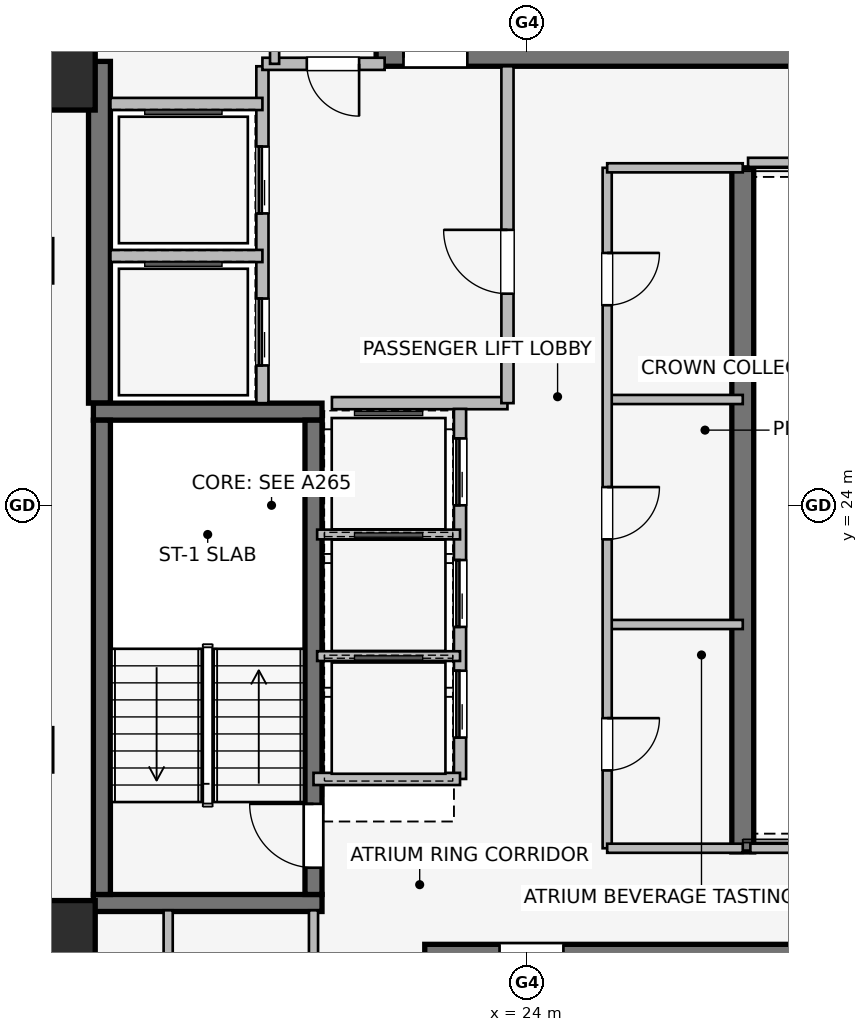
"""IFC4 building model, lengths in metres.
Left out: names, types, materials, properties, quantities, classifications, styles, units other than length and angle.
Written with IfcOpenShell. Run it as: python <this file> out.ifc"""

import sys

from ifc_helpers import new_model, si_unit, direction, frame, frame_2d, origin, origin_2d, place, context, subcontext, project, spatial, rectangle, extrude, element, fill, save


model = new_model("IFC4")
c1 = context("Model", 3, precision=1e-05, world=origin(), true_north=direction((0.0, 1.0)))
c2 = subcontext(c1, "Body", "Model", "MODEL_VIEW")
j1 = project(units=[si_unit("LENGTHUNIT", "METRE"), si_unit("PLANEANGLEUNIT", "RADIAN")], contexts=[c1])
p1 = place(None, origin())
s1 = spatial("IfcSite", under=j1, at=p1, CompositionType="ELEMENT")
p2 = place(p1, origin())
s2 = spatial("IfcBuilding", under=s1, at=p2, CompositionType="ELEMENT")
p3 = place(p2, frame((0.0, 0.0, 231.25)))
s3 = spatial("IfcBuildingStorey", under=s2, at=p3, CompositionType="ELEMENT", Elevation=231.25)
p4 = place(p3, frame((16.97, 25.68, 0.0), z_axis=(0.0, 0.0, 1.0), x_axis=(0.0, 1.0, 0.0)))
e1 = element("IfcWall", 1, at=p4, inside=s3, PredefinedType="SHEAR", context=c2, shape_type="SweptSolid", body=[
    extrude(rectangle(XDim=5.62, YDim=0.36, at=frame_2d((2.81, 0.0))), origin(), (0.0, 0.0, 1.0), 3.55),
])
p5 = place(p3, frame((27.55, 29.55, 0.0), z_axis=(0.0, 0.0, 1.0), x_axis=(0.0, -1.0, 0.0)))
e2 = element("IfcWall", 2, at=p5, inside=s3, PredefinedType="SHEAR", context=c2, shape_type="SweptSolid", body=[
    extrude(rectangle(XDim=11.25, YDim=0.36, at=frame_2d((5.625, 0.0))), origin(), (0.0, 0.0, 1.0), 3.55),
])
for number, where, z_axis, x_axis in (
    (3, (16.87, 17.46, 0.0), (0.0, 0.0, 1.0), (1.0, 0.0, 0.0)),
    (4, (20.63, 25.54, 0.0), (0.0, 0.0, 1.0), (-1.0, 0.0, 0.0)),
):
    element("IfcWall", number, at=place(p3, frame(where, z_axis=z_axis, x_axis=x_axis)), inside=s3, PredefinedType="SHEAR", context=c2, shape_type="SweptSolid", body=[
        extrude(rectangle(XDim=3.76, YDim=0.28, at=frame_2d((1.88, 0.0))), origin(), (0.0, 0.0, 1.0), 3.55),
    ])
p6 = place(p3, frame((17.01, 25.4, 0.0), z_axis=(0.0, 0.0, 1.0), x_axis=(0.0, -1.0, 0.0)))
e5 = element("IfcWall", 5, at=p6, inside=s3, PredefinedType="SHEAR", context=c2, shape_type="SweptSolid", body=[
    extrude(rectangle(XDim=7.8, YDim=0.28, at=frame_2d((3.9, 0.0))), origin(), (0.0, 0.0, 1.0), 3.55),
])
p7 = place(p3, frame((20.49, 17.6, 0.0), z_axis=(0.0, 0.0, 1.0), x_axis=(0.0, 1.0, 0.0)))
e6 = element("IfcWall", 6, at=p7, inside=s3, PredefinedType="SHEAR", context=c2, shape_type="SweptSolid", body=[
    extrude(rectangle(XDim=7.8, YDim=0.28, at=frame_2d((3.9, 0.0))), origin(), (0.0, 0.0, 1.0), 3.55),
])
p8 = place(p7, frame((0.44, 0.0, 0.0)))
e7 = element("IfcOpeningElement", 7, at=p8, cuts=e6, PredefinedType="OPENING", context=c2, shape_type="SweptSolid", body=[
    extrude(rectangle(XDim=1.05, YDim=2.0, at=frame_2d((0.525, 1.0))), frame((0.0, 0.15, 0.0), z_axis=(0.0, -1.0, 0.0), x_axis=(1.0, 0.0, 0.0)), (0.0, 0.0, 1.0), 0.3),
])
p9 = place(p3, frame((30.68, 16.64, 0.0), z_axis=(0.0, 0.0, 1.0), x_axis=(-1.0, 0.0, 0.0)))
e8 = element("IfcWall", 8, at=p9, inside=s3, PredefinedType="SHEAR", context=c2, shape_type="SweptSolid", body=[
    extrude(rectangle(XDim=8.36, YDim=0.28, at=frame_2d((4.18, 0.0))), origin(), (0.0, 0.0, 1.0), 3.55),
])
p10 = place(p9, frame((6.08, 0.0, 0.0)))
e9 = element("IfcOpeningElement", 9, at=p10, cuts=e8, PredefinedType="OPENING", context=c2, shape_type="SweptSolid", body=[
    extrude(rectangle(XDim=1.05, YDim=2.0, at=frame_2d((0.525, 1.0))), frame((0.0, 0.15, 0.0), z_axis=(0.0, -1.0, 0.0), x_axis=(1.0, 0.0, 0.0)), (0.0, 0.0, 1.0), 0.3),
])
p11 = place(p3, frame((21.52, 31.36, 0.0), z_axis=(0.0, 0.0, 1.0), x_axis=(1.0, 0.0, 0.0)))
e10 = element("IfcWall", 10, at=p11, inside=s3, PredefinedType="SHEAR", context=c2, shape_type="SweptSolid", body=[
    extrude(rectangle(XDim=8.36, YDim=0.28, at=frame_2d((4.18, 0.0))), origin(), (0.0, 0.0, 1.0), 3.55),
])
p12 = place(p11, frame((0.45, 0.0, 0.0)))
e11 = element("IfcOpeningElement", 11, at=p12, cuts=e10, PredefinedType="OPENING", context=c2, shape_type="SweptSolid", body=[
    extrude(rectangle(XDim=1.05, YDim=2.0, at=frame_2d((0.525, 1.0))), frame((0.0, 0.15, 0.0), z_axis=(0.0, -1.0, 0.0), x_axis=(1.0, 0.0, 0.0)), (0.0, 0.0, 1.0), 0.3),
])
for number, where, z_axis, x_axis in (
    (12, (16.3, 16.9, 0.0), (0.0, 0.0, 1.0), (1.0, 0.0, 0.0)),
    (13, (16.3, 31.1, 0.0), (0.0, 0.0, 1.0), (1.0, 0.0, 0.0)),
):
    element("IfcColumn", number, at=place(p3, frame(where, z_axis=z_axis, x_axis=x_axis)), inside=s3, PredefinedType="COLUMN", context=c2, shape_type="SweptSolid", body=[
        extrude(rectangle(XDim=1.2, YDim=1.2, at=origin_2d()), origin(), (0.0, 0.0, 1.0), 3.55),
    ])
p13 = place(p3, frame((19.65, 25.68, 0.0), z_axis=(0.0, 0.0, 1.0), x_axis=(0.0, 1.0, 0.0)))
e14 = element("IfcWall", 14, at=p13, inside=s3, PredefinedType="PARTITIONING", context=c2, shape_type="SweptSolid", body=[
    extrude(rectangle(XDim=5.54, YDim=0.2, at=frame_2d((2.77, 0.0))), origin(), (0.0, 0.0, 1.0), 3.26),
])
p14 = place(p13, frame((0.62, 0.0, 0.0)))
e15 = element("IfcOpeningElement", 15, at=p14, cuts=e14, PredefinedType="OPENING", context=c2, shape_type="SweptSolid", body=[
    extrude(rectangle(XDim=1.1, YDim=2.2, at=frame_2d((0.55, 1.1))), frame((0.0, 0.11, 0.0), z_axis=(0.0, -1.0, 0.0), x_axis=(1.0, 0.0, 0.0)), (0.0, 0.0, 1.0), 0.22),
])
p15 = place(p13, frame((3.12, 0.0, 0.0)))
e16 = element("IfcOpeningElement", 16, at=p15, cuts=e14, PredefinedType="OPENING", context=c2, shape_type="SweptSolid", body=[
    extrude(rectangle(XDim=1.1, YDim=2.2, at=frame_2d((0.55, 1.1))), frame((0.0, 0.11, 0.0), z_axis=(0.0, -1.0, 0.0), x_axis=(1.0, 0.0, 0.0)), (0.0, 0.0, 1.0), 0.22),
])
p16 = place(p3, frame((20.793, 25.68, 0.0), z_axis=(0.0, 0.0, 1.0), x_axis=(1.0, 0.0, 0.0)))
e17 = element("IfcWall", 17, at=p16, inside=s3, PredefinedType="PARTITIONING", context=c2, shape_type="SweptSolid", body=[
    extrude(rectangle(XDim=2.887, YDim=0.2, at=frame_2d((1.443, 0.0))), origin(), (0.0, 0.0, 1.0), 3.26),
])
p17 = place(p3, frame((23.68, 25.68, 0.0), z_axis=(0.0, 0.0, 1.0), x_axis=(0.0, 1.0, 0.0)))
e18 = element("IfcWall", 18, at=p17, inside=s3, PredefinedType="PARTITIONING", context=c2, shape_type="SweptSolid", body=[
    extrude(rectangle(XDim=5.54, YDim=0.2, at=frame_2d((2.77, 0.0))), origin(), (0.0, 0.0, 1.0), 3.26),
])
p18 = place(p17, frame((1.8, 0.0, 0.0)))
e19 = element("IfcOpeningElement", 19, at=p18, cuts=e18, PredefinedType="OPENING", context=c2, shape_type="SweptSolid", body=[
    extrude(rectangle(XDim=1.05, YDim=2.0, at=frame_2d((0.525, 1.0))), frame((0.0, 0.11, 0.0), z_axis=(0.0, -1.0, 0.0), x_axis=(1.0, 0.0, 0.0)), (0.0, 0.0, 1.0), 0.22),
])
p19 = place(p3, frame((21.66, 31.26, 0.0), z_axis=(0.0, 0.0, 1.0), x_axis=(-1.0, 0.0, 0.0)))
e20 = element("IfcWall", 20, at=p19, inside=s3, PredefinedType="PARTITIONING", context=c2, shape_type="SweptSolid", body=[
    extrude(rectangle(XDim=2.01, YDim=0.2, at=frame_2d((1.005, 0.0))), origin(), (0.0, 0.0, 1.0), 3.26),
])
p20 = place(p19, frame((0.42, 0.0, 0.0)))
e21 = element("IfcOpeningElement", 21, at=p20, cuts=e20, PredefinedType="OPENING", context=c2, shape_type="SweptSolid", body=[
    extrude(rectangle(XDim=0.86, YDim=2.0, at=frame_2d((0.43, 1.0))), frame((0.0, 0.11, 0.0), z_axis=(0.0, -1.0, 0.0), x_axis=(1.0, 0.0, 0.0)), (0.0, 0.0, 1.0), 0.22),
])
p21 = place(p3, frame((17.15, 28.1, 0.0), z_axis=(0.0, 0.0, 1.0), x_axis=(1.0, 0.0, 0.0)))
e22 = element("IfcWall", 22, at=p21, inside=s3, PredefinedType="PARTITIONING", context=c2, shape_type="SweptSolid", body=[
    extrude(rectangle(XDim=2.5, YDim=0.2, at=frame_2d((1.25, 0.0))), origin(), (0.0, 0.0, 1.0), 3.26),
])
p22 = place(p3, frame((19.65, 30.6, 0.0), z_axis=(0.0, 0.0, 1.0), x_axis=(-1.0, 0.0, 0.0)))
e23 = element("IfcWall", 23, at=p22, inside=s3, PredefinedType="PARTITIONING", context=c2, shape_type="SweptSolid", body=[
    extrude(rectangle(XDim=2.5, YDim=0.2, at=frame_2d((1.25, 0.0))), origin(), (0.0, 0.0, 1.0), 2.16),
])
p23 = place(p3, frame((22.9, 19.5, 0.0), z_axis=(0.0, 0.0, 1.0), x_axis=(0.0, 1.0, 0.0)))
e24 = element("IfcWall", 24, at=p23, inside=s3, PredefinedType="PARTITIONING", context=c2, shape_type="SweptSolid", body=[
    extrude(rectangle(XDim=6.085, YDim=0.2, at=frame_2d((3.042, 0.0))), origin(), (0.0, 0.0, 1.0), 3.26),
])
p24 = place(p23, frame((0.68, 0.0, 0.0)))
e25 = element("IfcOpeningElement", 25, at=p24, cuts=e24, PredefinedType="OPENING", context=c2, shape_type="SweptSolid", body=[
    extrude(rectangle(XDim=1.1, YDim=2.2, at=frame_2d((0.55, 1.1))), frame((0.0, 0.11, 0.0), z_axis=(0.0, -1.0, 0.0), x_axis=(1.0, 0.0, 0.0)), (0.0, 0.0, 1.0), 0.22),
])
p25 = place(p23, frame((2.5, 0.0, 0.0)))
e26 = element("IfcOpeningElement", 26, at=p25, cuts=e24, PredefinedType="OPENING", context=c2, shape_type="SweptSolid", body=[
    extrude(rectangle(XDim=1.1, YDim=2.2, at=frame_2d((0.55, 1.1))), frame((0.0, 0.11, 0.0), z_axis=(0.0, -1.0, 0.0), x_axis=(1.0, 0.0, 0.0)), (0.0, 0.0, 1.0), 0.22),
])
p26 = place(p23, frame((4.5, 0.0, 0.0)))
e27 = element("IfcOpeningElement", 27, at=p26, cuts=e24, PredefinedType="OPENING", context=c2, shape_type="SweptSolid", body=[
    extrude(rectangle(XDim=1.1, YDim=2.2, at=frame_2d((0.55, 1.1))), frame((0.0, 0.11, 0.0), z_axis=(0.0, -1.0, 0.0), x_axis=(1.0, 0.0, 0.0)), (0.0, 0.0, 1.0), 0.22),
])
p27 = place(p3, frame((20.49, 19.5, 0.0), z_axis=(0.0, 0.0, 1.0), x_axis=(1.0, 0.0, 0.0)))
e28 = element("IfcWall", 28, at=p27, inside=s3, PredefinedType="PARTITIONING", context=c2, shape_type="SweptSolid", body=[
    extrude(rectangle(XDim=2.41, YDim=0.2, at=frame_2d((1.205, 0.0))), origin(), (0.0, 0.0, 1.0), 2.16),
])
for number, where, z_axis, x_axis in (
    (29, (20.55, 21.52, 0.0), (0.0, 0.0, 1.0), (1.0, 0.0, 0.0)),
    (30, (20.55, 23.52, 0.0), (0.0, 0.0, 1.0), (1.0, 0.0, 0.0)),
):
    element("IfcWall", number, at=place(p3, frame(where, z_axis=z_axis, x_axis=x_axis)), inside=s3, PredefinedType="PARTITIONING", context=c2, shape_type="SweptSolid", body=[
        extrude(rectangle(XDim=2.35, YDim=0.16, at=frame_2d((1.175, 0.0))), origin(), (0.0, 0.0, 1.0), 3.26),
    ])
for number, where, z_axis, x_axis in (
    (31, (25.32, 22.04, 0.0), (0.0, 0.0, 1.0), (1.0, 0.0, 0.0)),
    (32, (25.32, 25.74, 0.0), (0.0, 0.0, 1.0), (1.0, 0.0, 0.0)),
):
    element("IfcWall", number, at=place(p3, frame(where, z_axis=z_axis, x_axis=x_axis)), inside=s3, PredefinedType="PARTITIONING", context=c2, shape_type="SweptSolid", body=[
        extrude(rectangle(XDim=2.23, YDim=0.15, at=frame_2d((1.115, 0.0))), origin(), (0.0, 0.0, 1.0), 3.26),
    ])
p28 = place(p3, frame((25.32, 29.55, 0.0), z_axis=(0.0, 0.0, 1.0), x_axis=(0.0, -1.0, 0.0)))
e33 = element("IfcWall", 33, at=p28, inside=s3, PredefinedType="PARTITIONING", context=c2, shape_type="SweptSolid", body=[
    extrude(rectangle(XDim=11.19, YDim=0.15, at=frame_2d((5.595, 0.0))), origin(), (0.0, 0.0, 1.0), 3.26),
])
p29 = place(p28, frame((1.4, 0.0, 0.0)))
e34 = element("IfcOpeningElement", 34, at=p29, cuts=e33, PredefinedType="OPENING", context=c2, shape_type="SweptSolid", body=[
    extrude(rectangle(XDim=0.86, YDim=2.0, at=frame_2d((0.43, 1.0))), frame((0.0, 0.085, 0.0), z_axis=(0.0, -1.0, 0.0), x_axis=(1.0, 0.0, 0.0)), (0.0, 0.0, 1.0), 0.17),
])
p30 = place(p28, frame((5.25, 0.0, 0.0)))
e35 = element("IfcOpeningElement", 35, at=p30, cuts=e33, PredefinedType="OPENING", context=c2, shape_type="SweptSolid", body=[
    extrude(rectangle(XDim=0.86, YDim=2.0, at=frame_2d((0.43, 1.0))), frame((0.0, 0.085, 0.0), z_axis=(0.0, -1.0, 0.0), x_axis=(1.0, 0.0, 0.0)), (0.0, 0.0, 1.0), 0.17),
])
p31 = place(p28, frame((9.05, 0.0, 0.0)))
e36 = element("IfcOpeningElement", 36, at=p31, cuts=e33, PredefinedType="OPENING", context=c2, shape_type="SweptSolid", body=[
    extrude(rectangle(XDim=0.86, YDim=2.0, at=frame_2d((0.43, 1.0))), frame((0.0, 0.085, 0.0), z_axis=(0.0, -1.0, 0.0), x_axis=(1.0, 0.0, 0.0)), (0.0, 0.0, 1.0), 0.17),
])
p32 = place(p3, frame((25.32, 18.36, 0.0), z_axis=(0.0, 0.0, 1.0), x_axis=(1.0, 0.0, 0.0)))
e37 = element("IfcWall", 37, at=p32, inside=s3, PredefinedType="PARTITIONING", context=c2, shape_type="SweptSolid", body=[
    extrude(rectangle(XDim=2.23, YDim=0.15, at=frame_2d((1.115, 0.0))), origin(), (0.0, 0.0, 1.0), 3.26),
])
p33 = place(p3, frame((27.55, 29.55, 0.0), z_axis=(0.0, 0.0, 1.0), x_axis=(-1.0, 0.0, 0.0)))
e38 = element("IfcWall", 38, at=p33, inside=s3, PredefinedType="PARTITIONING", context=c2, shape_type="SweptSolid", body=[
    extrude(rectangle(XDim=2.23, YDim=0.15, at=frame_2d((1.115, 0.0))), origin(), (0.0, 0.0, 1.0), 2.16),
])
p34 = place(p3, frame((18.1, 17.34, 0.0), z_axis=(0.0, 0.0, 1.0), x_axis=(0.0, -1.0, 0.0)))
e39 = element("IfcWall", 39, at=p34, inside=s3, PredefinedType="PARTITIONING", context=c2, shape_type="SweptSolid", body=[
    extrude(rectangle(XDim=2.52, YDim=0.15, at=frame_2d((1.26, 0.0))), origin(), (0.0, 0.0, 1.0), 3.26),
])
p35 = place(p3, frame((20.49, 14.82, 0.0), z_axis=(0.0, 0.0, 1.0), x_axis=(0.0, 1.0, 0.0)))
e40 = element("IfcWall", 40, at=p35, inside=s3, PredefinedType="PARTITIONING", context=c2, shape_type="SweptSolid", body=[
    extrude(rectangle(XDim=2.52, YDim=0.15, at=frame_2d((1.26, 0.0))), origin(), (0.0, 0.0, 1.0), 3.26),
])
p36 = place(p35, frame((0.72, 0.0, 0.0)))
e41 = element("IfcOpeningElement", 41, at=p36, cuts=e40, PredefinedType="OPENING", context=c2, shape_type="SweptSolid", body=[
    extrude(rectangle(XDim=0.86, YDim=2.0, at=frame_2d((0.43, 1.0))), frame((0.0, 0.085, 0.0), z_axis=(0.0, -1.0, 0.0), x_axis=(1.0, 0.0, 0.0)), (0.0, 0.0, 1.0), 0.17),
])
p37 = place(p3, frame((19.85, 33.45, 0.0), z_axis=(0.0, 0.0, 1.0), x_axis=(0.0, -1.0, 0.0)))
e42 = element("IfcWall", 42, at=p37, inside=s3, PredefinedType="PARTITIONING", context=c2, shape_type="SweptSolid", body=[
    extrude(rectangle(XDim=2.19, YDim=0.15, at=frame_2d((1.095, 0.0))), origin(), (0.0, 0.0, 1.0), 3.26),
])
p38 = place(p3, frame((27.675, 18.36, 0.0), z_axis=(0.0, 0.0, 1.0), x_axis=(1.0, 0.0, 0.0)))
e43 = element("IfcWall", 43, at=p38, inside=s3, PredefinedType="PARTITIONING", context=c2, shape_type="SweptSolid", body=[
    extrude(rectangle(XDim=12.165, YDim=0.15, at=frame_2d((6.083, 0.0))), origin(), (0.0, 0.0, 1.0), 2.401),
])
p39 = place(p3, frame((39.84, 29.64, 0.0), z_axis=(0.0, 0.0, 1.0), x_axis=(-1.0, 0.0, 0.0)))
e44 = element("IfcWall", 44, at=p39, inside=s3, PredefinedType="PARTITIONING", context=c2, shape_type="SweptSolid", body=[
    extrude(rectangle(XDim=12.203, YDim=0.15, at=frame_2d((6.102, 0.0))), origin(), (0.0, 0.0, 1.0), 2.401),
])
p40 = place(p8, origin())
e45 = element("IfcDoor", 45, at=p40, inside=s3, OperationType="SINGLE_SWING_RIGHT", PredefinedType="DOOR", context=c2, shape_type="SweptSolid", body=[
    extrude(rectangle(XDim=1.05, YDim=2.0, at=frame_2d((0.525, 1.0))), frame((0.0, 0.025, 0.0), z_axis=(0.0, -1.0, 0.0), x_axis=(1.0, 0.0, 0.0)), (0.0, 0.0, 1.0), 0.05),
])
fill(e7, e45)
p41 = place(p10, origin())
e46 = element("IfcDoor", 46, at=p41, inside=s3, OperationType="SINGLE_SWING_RIGHT", PredefinedType="DOOR", context=c2, shape_type="SweptSolid", body=[
    extrude(rectangle(XDim=1.05, YDim=2.0, at=frame_2d((0.525, 1.0))), frame((0.0, 0.025, 0.0), z_axis=(0.0, -1.0, 0.0), x_axis=(1.0, 0.0, 0.0)), (0.0, 0.0, 1.0), 0.05),
])
fill(e9, e46)
p42 = place(p12, origin())
e47 = element("IfcDoor", 47, at=p42, inside=s3, OperationType="SINGLE_SWING_LEFT", PredefinedType="DOOR", context=c2, shape_type="SweptSolid", body=[
    extrude(rectangle(XDim=1.05, YDim=2.0, at=frame_2d((0.525, 1.0))), frame((0.0, 0.025, 0.0), z_axis=(0.0, -1.0, 0.0), x_axis=(1.0, 0.0, 0.0)), (0.0, 0.0, 1.0), 0.05),
])
fill(e11, e47)
p43 = place(p14, origin())
e48 = element("IfcDoor", 48, at=p43, inside=s3, OperationType="SLIDING_TO_LEFT", PredefinedType="DOOR", context=c2, shape_type="SweptSolid", body=[
    extrude(rectangle(XDim=1.1, YDim=2.2, at=frame_2d((0.55, 1.1))), frame((0.0, 0.025, 0.0), z_axis=(0.0, -1.0, 0.0), x_axis=(1.0, 0.0, 0.0)), (0.0, 0.0, 1.0), 0.05),
])
fill(e15, e48)
p44 = place(p15, origin())
e49 = element("IfcDoor", 49, at=p44, inside=s3, OperationType="SLIDING_TO_LEFT", PredefinedType="DOOR", context=c2, shape_type="SweptSolid", body=[
    extrude(rectangle(XDim=1.1, YDim=2.2, at=frame_2d((0.55, 1.1))), frame((0.0, 0.025, 0.0), z_axis=(0.0, -1.0, 0.0), x_axis=(1.0, 0.0, 0.0)), (0.0, 0.0, 1.0), 0.05),
])
fill(e16, e49)
p45 = place(p18, origin())
e50 = element("IfcDoor", 50, at=p45, inside=s3, OperationType="SINGLE_SWING_RIGHT", PredefinedType="DOOR", context=c2, shape_type="SweptSolid", body=[
    extrude(rectangle(XDim=1.05, YDim=2.0, at=frame_2d((0.525, 1.0))), frame((0.0, 0.025, 0.0), z_axis=(0.0, -1.0, 0.0), x_axis=(1.0, 0.0, 0.0)), (0.0, 0.0, 1.0), 0.05),
])
fill(e19, e50)
p46 = place(p20, origin())
e51 = element("IfcDoor", 51, at=p46, inside=s3, OperationType="SINGLE_SWING_LEFT", PredefinedType="DOOR", context=c2, shape_type="SweptSolid", body=[
    extrude(rectangle(XDim=0.86, YDim=2.0, at=frame_2d((0.43, 1.0))), frame((0.0, 0.025, 0.0), z_axis=(0.0, -1.0, 0.0), x_axis=(1.0, 0.0, 0.0)), (0.0, 0.0, 1.0), 0.05),
])
fill(e21, e51)
p47 = place(p24, origin())
e52 = element("IfcDoor", 52, at=p47, inside=s3, OperationType="SLIDING_TO_LEFT", PredefinedType="DOOR", context=c2, shape_type="SweptSolid", body=[
    extrude(rectangle(XDim=1.1, YDim=2.2, at=frame_2d((0.55, 1.1))), frame((0.0, 0.025, 0.0), z_axis=(0.0, -1.0, 0.0), x_axis=(1.0, 0.0, 0.0)), (0.0, 0.0, 1.0), 0.05),
])
fill(e25, e52)
p48 = place(p25, origin())
e53 = element("IfcDoor", 53, at=p48, inside=s3, OperationType="SLIDING_TO_LEFT", PredefinedType="DOOR", context=c2, shape_type="SweptSolid", body=[
    extrude(rectangle(XDim=1.1, YDim=2.2, at=frame_2d((0.55, 1.1))), frame((0.0, 0.025, 0.0), z_axis=(0.0, -1.0, 0.0), x_axis=(1.0, 0.0, 0.0)), (0.0, 0.0, 1.0), 0.05),
])
fill(e26, e53)
p49 = place(p26, origin())
e54 = element("IfcDoor", 54, at=p49, inside=s3, OperationType="SLIDING_TO_LEFT", PredefinedType="DOOR", context=c2, shape_type="SweptSolid", body=[
    extrude(rectangle(XDim=1.1, YDim=2.2, at=frame_2d((0.55, 1.1))), frame((0.0, 0.025, 0.0), z_axis=(0.0, -1.0, 0.0), x_axis=(1.0, 0.0, 0.0)), (0.0, 0.0, 1.0), 0.05),
])
fill(e27, e54)
p50 = place(p29, origin())
e55 = element("IfcDoor", 55, at=p50, inside=s3, OperationType="SINGLE_SWING_LEFT", PredefinedType="DOOR", context=c2, shape_type="SweptSolid", body=[
    extrude(rectangle(XDim=0.86, YDim=2.0, at=frame_2d((0.43, 1.0))), frame((0.0, 0.025, 0.0), z_axis=(0.0, -1.0, 0.0), x_axis=(1.0, 0.0, 0.0)), (0.0, 0.0, 1.0), 0.05),
])
fill(e34, e55)
p51 = place(p30, origin())
e56 = element("IfcDoor", 56, at=p51, inside=s3, OperationType="SINGLE_SWING_LEFT", PredefinedType="DOOR", context=c2, shape_type="SweptSolid", body=[
    extrude(rectangle(XDim=0.86, YDim=2.0, at=frame_2d((0.43, 1.0))), frame((0.0, 0.025, 0.0), z_axis=(0.0, -1.0, 0.0), x_axis=(1.0, 0.0, 0.0)), (0.0, 0.0, 1.0), 0.05),
])
fill(e35, e56)
p52 = place(p31, origin())
e57 = element("IfcDoor", 57, at=p52, inside=s3, OperationType="SINGLE_SWING_LEFT", PredefinedType="DOOR", context=c2, shape_type="SweptSolid", body=[
    extrude(rectangle(XDim=0.86, YDim=2.0, at=frame_2d((0.43, 1.0))), frame((0.0, 0.025, 0.0), z_axis=(0.0, -1.0, 0.0), x_axis=(1.0, 0.0, 0.0)), (0.0, 0.0, 1.0), 0.05),
])
fill(e36, e57)
save(model, sys.argv[1])
